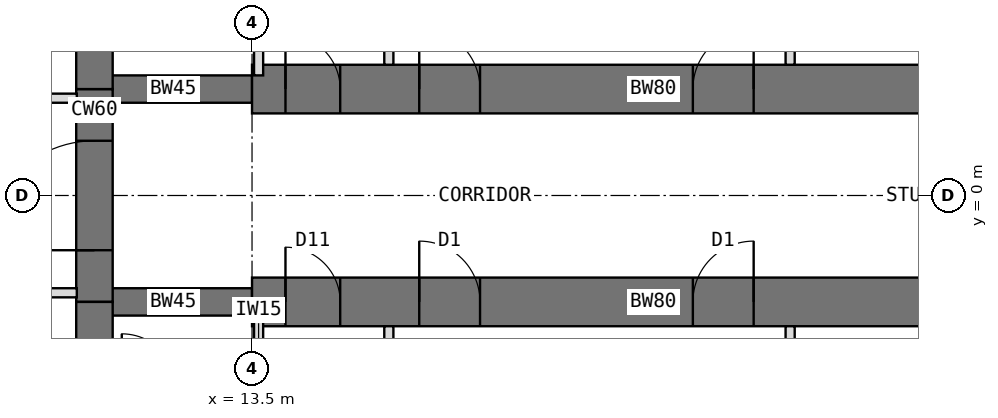
"""IFC4 building model, lengths in metres.
Left out: names, types, materials, properties, quantities, classifications, styles, units other than length and angle.
Written with IfcOpenShell. Run it as: python <this file> out.ifc"""

import sys

from ifc_helpers import new_model, si_unit, direction, frame, frame_2d, origin, place, context, subcontext, project, spatial, rectangle, extrude, element, fill, save


model = new_model("IFC4")
c1 = context("Model", 3, precision=1e-05, world=origin(), true_north=direction((0.0, 1.0)))
c2 = subcontext(c1, "Body", "Model", "MODEL_VIEW")
j1 = project(units=[si_unit("LENGTHUNIT", "METRE"), si_unit("PLANEANGLEUNIT", "RADIAN")], contexts=[c1])
p1 = place(None, origin())
s1 = spatial("IfcSite", under=j1, at=p1, CompositionType="ELEMENT")
p2 = place(p1, origin())
s2 = spatial("IfcBuilding", under=s1, at=p2, CompositionType="ELEMENT")
p3 = place(p2, frame((0.0, 0.0, 125.5)))
s3 = spatial("IfcBuildingStorey", under=s2, at=p3, CompositionType="ELEMENT", Elevation=125.5)
p4 = place(p3, frame((10.908, -6.298, 0.0), z_axis=(0.0, 0.0, 1.0), x_axis=(0.0, 1.0, 0.0)))
e1 = element("IfcWall", 1, at=p4, inside=s3, PredefinedType="SHEAR", context=c2, shape_type="SweptSolid", body=[
    extrude(rectangle(XDim=4.548, YDim=0.6, at=frame_2d((2.274, 0.0))), origin(), (0.0, 0.0, 1.0), 4.0),
])
p5 = place(p3, frame((10.908, -1.75, 0.0), z_axis=(0.0, 0.0, 1.0), x_axis=(0.0, 1.0, 0.0)))
e2 = element("IfcWall", 2, at=p5, inside=s3, PredefinedType="SHEAR", context=c2, shape_type="SweptSolid", body=[
    extrude(rectangle(XDim=3.5, YDim=0.6, at=frame_2d((1.75, 0.0))), origin(), (0.0, 0.0, 1.0), 4.0),
])
p6 = place(p5, frame((0.85, 0.0, 0.0)))
e3 = element("IfcOpeningElement", 3, at=p6, cuts=e2, PredefinedType="OPENING", context=c2, shape_type="SweptSolid", body=[
    extrude(rectangle(XDim=1.8, YDim=2.1, at=frame_2d((0.9, 1.05))), frame((0.0, 0.31, 0.0), z_axis=(0.0, -1.0, 0.0), x_axis=(1.0, 0.0, 0.0)), (0.0, 0.0, 1.0), 0.62),
])
p7 = place(p3, frame((10.908, 1.75, 0.0), z_axis=(0.0, 0.0, 1.0), x_axis=(0.0, 1.0, 0.0)))
e4 = element("IfcWall", 4, at=p7, inside=s3, PredefinedType="SHEAR", context=c2, shape_type="SweptSolid", body=[
    extrude(rectangle(XDim=4.548, YDim=0.6, at=frame_2d((2.274, 0.0))), origin(), (0.0, 0.0, 1.0), 4.0),
])
p8 = place(p3, frame((10.908, 1.75, 0.0), z_axis=(0.0, 0.0, 1.0), x_axis=(1.0, 0.0, 0.0)))
e5 = element("IfcWall", 5, at=p8, inside=s3, PredefinedType="SHEAR", context=c2, shape_type="SweptSolid", body=[
    extrude(rectangle(XDim=2.592, YDim=0.45, at=frame_2d((1.296, 0.0))), origin(), (0.0, 0.0, 1.0), 4.0),
])
p9 = place(p3, frame((13.5, 1.75, 0.0), z_axis=(0.0, 0.0, 1.0), x_axis=(1.0, 0.0, 0.0)))
e6 = element("IfcWall", 6, at=p9, inside=s3, PredefinedType="SHEAR", context=c2, shape_type="SweptSolid", body=[
    extrude(rectangle(XDim=13.2, YDim=0.8, at=frame_2d((6.6, 0.0))), origin(), (0.0, 0.0, 1.0), 4.0),
])
p10 = place(p9, frame((0.55, 0.0, 0.0)))
e7 = element("IfcOpeningElement", 7, at=p10, cuts=e6, PredefinedType="OPENING", context=c2, shape_type="SweptSolid", body=[
    extrude(rectangle(XDim=0.9, YDim=2.1, at=frame_2d((0.45, 1.05))), frame((0.0, 0.41, 0.0), z_axis=(0.0, -1.0, 0.0), x_axis=(1.0, 0.0, 0.0)), (0.0, 0.0, 1.0), 0.82),
])
p11 = place(p9, frame((2.75, 0.0, 0.0)))
e8 = element("IfcOpeningElement", 8, at=p11, cuts=e6, PredefinedType="OPENING", context=c2, shape_type="SweptSolid", body=[
    extrude(rectangle(XDim=1.0, YDim=2.1, at=frame_2d((0.5, 1.05))), frame((0.0, 0.41, 0.0), z_axis=(0.0, -1.0, 0.0), x_axis=(1.0, 0.0, 0.0)), (0.0, 0.0, 1.0), 0.82),
])
p12 = place(p9, frame((7.25, 0.0, 0.0)))
e9 = element("IfcOpeningElement", 9, at=p12, cuts=e6, PredefinedType="OPENING", context=c2, shape_type="SweptSolid", body=[
    extrude(rectangle(XDim=1.0, YDim=2.1, at=frame_2d((0.5, 1.05))), frame((0.0, 0.41, 0.0), z_axis=(0.0, -1.0, 0.0), x_axis=(1.0, 0.0, 0.0)), (0.0, 0.0, 1.0), 0.82),
])
p13 = place(p3, frame((10.908, -1.75, 0.0), z_axis=(0.0, 0.0, 1.0), x_axis=(1.0, 0.0, 0.0)))
e10 = element("IfcWall", 10, at=p13, inside=s3, PredefinedType="SHEAR", context=c2, shape_type="SweptSolid", body=[
    extrude(rectangle(XDim=2.592, YDim=0.45, at=frame_2d((1.296, 0.0))), origin(), (0.0, 0.0, 1.0), 4.0),
])
p14 = place(p3, frame((13.5, -1.75, 0.0), z_axis=(0.0, 0.0, 1.0), x_axis=(1.0, 0.0, 0.0)))
e11 = element("IfcWall", 11, at=p14, inside=s3, PredefinedType="SHEAR", context=c2, shape_type="SweptSolid", body=[
    extrude(rectangle(XDim=13.2, YDim=0.8, at=frame_2d((6.6, 0.0))), origin(), (0.0, 0.0, 1.0), 4.0),
])
p15 = place(p14, frame((0.55, 0.0, 0.0)))
e12 = element("IfcOpeningElement", 12, at=p15, cuts=e11, PredefinedType="OPENING", context=c2, shape_type="SweptSolid", body=[
    extrude(rectangle(XDim=0.9, YDim=2.1, at=frame_2d((0.45, 1.05))), frame((0.0, 0.41, 0.0), z_axis=(0.0, -1.0, 0.0), x_axis=(1.0, 0.0, 0.0)), (0.0, 0.0, 1.0), 0.82),
])
p16 = place(p14, frame((2.75, 0.0, 0.0)))
e13 = element("IfcOpeningElement", 13, at=p16, cuts=e11, PredefinedType="OPENING", context=c2, shape_type="SweptSolid", body=[
    extrude(rectangle(XDim=1.0, YDim=2.1, at=frame_2d((0.5, 1.05))), frame((0.0, 0.41, 0.0), z_axis=(0.0, -1.0, 0.0), x_axis=(1.0, 0.0, 0.0)), (0.0, 0.0, 1.0), 0.82),
])
p17 = place(p14, frame((7.25, 0.0, 0.0)))
e14 = element("IfcOpeningElement", 14, at=p17, cuts=e11, PredefinedType="OPENING", context=c2, shape_type="SweptSolid", body=[
    extrude(rectangle(XDim=1.0, YDim=2.1, at=frame_2d((0.5, 1.05))), frame((0.0, 0.41, 0.0), z_axis=(0.0, -1.0, 0.0), x_axis=(1.0, 0.0, 0.0)), (0.0, 0.0, 1.0), 0.82),
])
p18 = place(p3, frame((15.75, 2.15, 0.0), z_axis=(0.0, 0.0, 1.0), x_axis=(0.0, 1.0, 0.0)))
e15 = element("IfcWall", 15, at=p18, inside=s3, PredefinedType="PARTITIONING", context=c2, shape_type="SweptSolid", body=[
    extrude(rectangle(XDim=4.6, YDim=0.15, at=frame_2d((2.3, 0.0))), origin(), (0.0, 0.0, 1.0), 3.8),
])
p19 = place(p3, frame((22.35, 2.15, 0.0), z_axis=(0.0, 0.0, 1.0), x_axis=(0.0, 1.0, 0.0)))
e16 = element("IfcWall", 16, at=p19, inside=s3, PredefinedType="PARTITIONING", context=c2, shape_type="SweptSolid", body=[
    extrude(rectangle(XDim=2.4, YDim=0.15, at=frame_2d((1.2, 0.0))), origin(), (0.0, 0.0, 1.0), 3.8),
])
p20 = place(p19, frame((0.7, 0.0, 0.0)))
e17 = element("IfcOpeningElement", 17, at=p20, cuts=e16, PredefinedType="OPENING", context=c2, shape_type="SweptSolid", body=[
    extrude(rectangle(XDim=1.0, YDim=2.1, at=frame_2d((0.5, 1.05))), frame((0.0, 0.085, 0.0), z_axis=(0.0, -1.0, 0.0), x_axis=(1.0, 0.0, 0.0)), (0.0, 0.0, 1.0), 0.17),
])
p21 = place(p3, frame((13.608, 1.975, 0.0), z_axis=(0.0, 0.0, 1.0), x_axis=(0.0, 1.0, 0.0)))
e18 = element("IfcWall", 18, at=p21, inside=s3, PredefinedType="PARTITIONING", context=c2, shape_type="SweptSolid", body=[
    extrude(rectangle(XDim=3.2, YDim=0.15, at=frame_2d((1.6, 0.0))), origin(), (0.0, 0.0, 1.0), 3.8),
])
p22 = place(p3, frame((15.75, -2.15, 0.0), z_axis=(0.0, 0.0, 1.0), x_axis=(0.0, -1.0, 0.0)))
e19 = element("IfcWall", 19, at=p22, inside=s3, PredefinedType="PARTITIONING", context=c2, shape_type="SweptSolid", body=[
    extrude(rectangle(XDim=4.6, YDim=0.15, at=frame_2d((2.3, 0.0))), origin(), (0.0, 0.0, 1.0), 3.8),
])
p23 = place(p3, frame((22.35, -2.15, 0.0), z_axis=(0.0, 0.0, 1.0), x_axis=(0.0, -1.0, 0.0)))
e20 = element("IfcWall", 20, at=p23, inside=s3, PredefinedType="PARTITIONING", context=c2, shape_type="SweptSolid", body=[
    extrude(rectangle(XDim=2.4, YDim=0.15, at=frame_2d((1.2, 0.0))), origin(), (0.0, 0.0, 1.0), 3.8),
])
p24 = place(p23, frame((0.7, 0.0, 0.0)))
e21 = element("IfcOpeningElement", 21, at=p24, cuts=e20, PredefinedType="OPENING", context=c2, shape_type="SweptSolid", body=[
    extrude(rectangle(XDim=1.0, YDim=2.1, at=frame_2d((0.5, 1.05))), frame((0.0, 0.085, 0.0), z_axis=(0.0, -1.0, 0.0), x_axis=(1.0, 0.0, 0.0)), (0.0, 0.0, 1.0), 0.17),
])
p25 = place(p3, frame((13.608, -1.975, 0.0), z_axis=(0.0, 0.0, 1.0), x_axis=(0.0, -1.0, 0.0)))
e22 = element("IfcWall", 22, at=p25, inside=s3, PredefinedType="PARTITIONING", context=c2, shape_type="SweptSolid", body=[
    extrude(rectangle(XDim=1.2, YDim=0.15, at=frame_2d((0.6, 0.0))), origin(), (0.0, 0.0, 1.0), 3.8),
])
p26 = place(p3, frame((6.1, 1.6, 0.0), z_axis=(0.0, 0.0, 1.0), x_axis=(1.0, 0.0, 0.0)))
e23 = element("IfcWall", 23, at=p26, inside=s3, PredefinedType="PARTITIONING", context=c2, shape_type="SweptSolid", body=[
    extrude(rectangle(XDim=4.519, YDim=0.15, at=frame_2d((2.259, 0.0))), origin(), (0.0, 0.0, 1.0), 3.8),
])
p27 = place(p26, frame((1.769, 0.0, 0.0)))
e24 = element("IfcOpeningElement", 24, at=p27, cuts=e23, PredefinedType="OPENING", context=c2, shape_type="SweptSolid", body=[
    extrude(rectangle(XDim=1.0, YDim=2.1, at=frame_2d((0.5, 1.05))), frame((0.0, 0.085, 0.0), z_axis=(0.0, -1.0, 0.0), x_axis=(1.0, 0.0, 0.0)), (0.0, 0.0, 1.0), 0.17),
])
p28 = place(p3, frame((10.618, -1.6, 0.0), z_axis=(0.0, 0.0, 1.0), x_axis=(-1.0, 0.0, 0.0)))
e25 = element("IfcWall", 25, at=p28, inside=s3, PredefinedType="PARTITIONING", context=c2, shape_type="SweptSolid", body=[
    extrude(rectangle(XDim=4.519, YDim=0.15, at=frame_2d((2.259, 0.0))), origin(), (0.0, 0.0, 1.0), 3.8),
])
p29 = place(p28, frame((1.749, 0.0, 0.0)))
e26 = element("IfcOpeningElement", 26, at=p29, cuts=e25, PredefinedType="OPENING", context=c2, shape_type="SweptSolid", body=[
    extrude(rectangle(XDim=1.0, YDim=2.1, at=frame_2d((0.5, 1.05))), frame((0.0, 0.085, 0.0), z_axis=(0.0, -1.0, 0.0), x_axis=(1.0, 0.0, 0.0)), (0.0, 0.0, 1.0), 0.17),
])
p30 = place(p6, origin())
e27 = element("IfcDoor", 27, at=p30, inside=s3, OperationType="DOUBLE_DOOR_DOUBLE_SWING", PredefinedType="DOOR", context=c2, shape_type="SweptSolid", body=[
    extrude(rectangle(XDim=1.72, YDim=2.06, at=frame_2d((0.9, 1.03))), frame((0.0, 0.025, 0.0), z_axis=(0.0, -1.0, 0.0), x_axis=(1.0, 0.0, 0.0)), (0.0, 0.0, 1.0), 0.05),
    extrude(rectangle(XDim=0.04, YDim=2.1, at=frame_2d((0.02, 1.05))), frame((0.0, 0.3, 0.0), z_axis=(0.0, -1.0, 0.0), x_axis=(1.0, 0.0, 0.0)), (0.0, 0.0, 1.0), 0.6),
    extrude(rectangle(XDim=0.04, YDim=2.1, at=frame_2d((1.78, 1.05))), frame((0.0, 0.3, 0.0), z_axis=(0.0, -1.0, 0.0), x_axis=(1.0, 0.0, 0.0)), (0.0, 0.0, 1.0), 0.6),
    extrude(rectangle(XDim=1.72, YDim=0.04, at=frame_2d((0.9, 2.08))), frame((0.0, 0.3, 0.0), z_axis=(0.0, -1.0, 0.0), x_axis=(1.0, 0.0, 0.0)), (0.0, 0.0, 1.0), 0.6),
])
fill(e3, e27)
p31 = place(p10, origin())
e28 = element("IfcDoor", 28, at=p31, inside=s3, OperationType="SINGLE_SWING_LEFT", PredefinedType="DOOR", context=c2, shape_type="SweptSolid", body=[
    extrude(rectangle(XDim=0.82, YDim=2.06, at=frame_2d((0.45, 1.03))), frame((0.0, 0.025, 0.0), z_axis=(0.0, -1.0, 0.0), x_axis=(1.0, 0.0, 0.0)), (0.0, 0.0, 1.0), 0.05),
    extrude(rectangle(XDim=0.04, YDim=2.1, at=frame_2d((0.02, 1.05))), frame((0.0, 0.4, 0.0), z_axis=(0.0, -1.0, 0.0), x_axis=(1.0, 0.0, 0.0)), (0.0, 0.0, 1.0), 0.8),
    extrude(rectangle(XDim=0.04, YDim=2.1, at=frame_2d((0.88, 1.05))), frame((0.0, 0.4, 0.0), z_axis=(0.0, -1.0, 0.0), x_axis=(1.0, 0.0, 0.0)), (0.0, 0.0, 1.0), 0.8),
    extrude(rectangle(XDim=0.82, YDim=0.04, at=frame_2d((0.45, 2.08))), frame((0.0, 0.4, 0.0), z_axis=(0.0, -1.0, 0.0), x_axis=(1.0, 0.0, 0.0)), (0.0, 0.0, 1.0), 0.8),
])
fill(e7, e28)
p32 = place(p11, origin())
e29 = element("IfcDoor", 29, at=p32, inside=s3, OperationType="SINGLE_SWING_LEFT", PredefinedType="DOOR", context=c2, shape_type="SweptSolid", body=[
    extrude(rectangle(XDim=0.92, YDim=2.06, at=frame_2d((0.5, 1.03))), frame((0.0, 0.025, 0.0), z_axis=(0.0, -1.0, 0.0), x_axis=(1.0, 0.0, 0.0)), (0.0, 0.0, 1.0), 0.05),
    extrude(rectangle(XDim=0.04, YDim=2.1, at=frame_2d((0.02, 1.05))), frame((0.0, 0.4, 0.0), z_axis=(0.0, -1.0, 0.0), x_axis=(1.0, 0.0, 0.0)), (0.0, 0.0, 1.0), 0.8),
    extrude(rectangle(XDim=0.04, YDim=2.1, at=frame_2d((0.98, 1.05))), frame((0.0, 0.4, 0.0), z_axis=(0.0, -1.0, 0.0), x_axis=(1.0, 0.0, 0.0)), (0.0, 0.0, 1.0), 0.8),
    extrude(rectangle(XDim=0.92, YDim=0.04, at=frame_2d((0.5, 2.08))), frame((0.0, 0.4, 0.0), z_axis=(0.0, -1.0, 0.0), x_axis=(1.0, 0.0, 0.0)), (0.0, 0.0, 1.0), 0.8),
])
fill(e8, e29)
p33 = place(p12, origin())
e30 = element("IfcDoor", 30, at=p33, inside=s3, OperationType="SINGLE_SWING_RIGHT", PredefinedType="DOOR", context=c2, shape_type="SweptSolid", body=[
    extrude(rectangle(XDim=0.92, YDim=2.06, at=frame_2d((0.5, 1.03))), frame((0.0, 0.025, 0.0), z_axis=(0.0, -1.0, 0.0), x_axis=(1.0, 0.0, 0.0)), (0.0, 0.0, 1.0), 0.05),
    extrude(rectangle(XDim=0.04, YDim=2.1, at=frame_2d((0.02, 1.05))), frame((0.0, 0.4, 0.0), z_axis=(0.0, -1.0, 0.0), x_axis=(1.0, 0.0, 0.0)), (0.0, 0.0, 1.0), 0.8),
    extrude(rectangle(XDim=0.04, YDim=2.1, at=frame_2d((0.98, 1.05))), frame((0.0, 0.4, 0.0), z_axis=(0.0, -1.0, 0.0), x_axis=(1.0, 0.0, 0.0)), (0.0, 0.0, 1.0), 0.8),
    extrude(rectangle(XDim=0.92, YDim=0.04, at=frame_2d((0.5, 2.08))), frame((0.0, 0.4, 0.0), z_axis=(0.0, -1.0, 0.0), x_axis=(1.0, 0.0, 0.0)), (0.0, 0.0, 1.0), 0.8),
])
fill(e9, e30)
p34 = place(p15, origin())
e31 = element("IfcDoor", 31, at=p34, inside=s3, OperationType="SINGLE_SWING_LEFT", PredefinedType="DOOR", context=c2, shape_type="SweptSolid", body=[
    extrude(rectangle(XDim=0.82, YDim=2.06, at=frame_2d((0.45, 1.03))), frame((0.0, 0.025, 0.0), z_axis=(0.0, -1.0, 0.0), x_axis=(1.0, 0.0, 0.0)), (0.0, 0.0, 1.0), 0.05),
    extrude(rectangle(XDim=0.04, YDim=2.1, at=frame_2d((0.02, 1.05))), frame((0.0, 0.4, 0.0), z_axis=(0.0, -1.0, 0.0), x_axis=(1.0, 0.0, 0.0)), (0.0, 0.0, 1.0), 0.8),
    extrude(rectangle(XDim=0.04, YDim=2.1, at=frame_2d((0.88, 1.05))), frame((0.0, 0.4, 0.0), z_axis=(0.0, -1.0, 0.0), x_axis=(1.0, 0.0, 0.0)), (0.0, 0.0, 1.0), 0.8),
    extrude(rectangle(XDim=0.82, YDim=0.04, at=frame_2d((0.45, 2.08))), frame((0.0, 0.4, 0.0), z_axis=(0.0, -1.0, 0.0), x_axis=(1.0, 0.0, 0.0)), (0.0, 0.0, 1.0), 0.8),
])
fill(e12, e31)
p35 = place(p16, origin())
e32 = element("IfcDoor", 32, at=p35, inside=s3, OperationType="SINGLE_SWING_LEFT", PredefinedType="DOOR", context=c2, shape_type="SweptSolid", body=[
    extrude(rectangle(XDim=0.92, YDim=2.06, at=frame_2d((0.5, 1.03))), frame((0.0, 0.025, 0.0), z_axis=(0.0, -1.0, 0.0), x_axis=(1.0, 0.0, 0.0)), (0.0, 0.0, 1.0), 0.05),
    extrude(rectangle(XDim=0.04, YDim=2.1, at=frame_2d((0.02, 1.05))), frame((0.0, 0.4, 0.0), z_axis=(0.0, -1.0, 0.0), x_axis=(1.0, 0.0, 0.0)), (0.0, 0.0, 1.0), 0.8),
    extrude(rectangle(XDim=0.04, YDim=2.1, at=frame_2d((0.98, 1.05))), frame((0.0, 0.4, 0.0), z_axis=(0.0, -1.0, 0.0), x_axis=(1.0, 0.0, 0.0)), (0.0, 0.0, 1.0), 0.8),
    extrude(rectangle(XDim=0.92, YDim=0.04, at=frame_2d((0.5, 2.08))), frame((0.0, 0.4, 0.0), z_axis=(0.0, -1.0, 0.0), x_axis=(1.0, 0.0, 0.0)), (0.0, 0.0, 1.0), 0.8),
])
fill(e13, e32)
p36 = place(p17, origin())
e33 = element("IfcDoor", 33, at=p36, inside=s3, OperationType="SINGLE_SWING_RIGHT", PredefinedType="DOOR", context=c2, shape_type="SweptSolid", body=[
    extrude(rectangle(XDim=0.92, YDim=2.06, at=frame_2d((0.5, 1.03))), frame((0.0, 0.025, 0.0), z_axis=(0.0, -1.0, 0.0), x_axis=(1.0, 0.0, 0.0)), (0.0, 0.0, 1.0), 0.05),
    extrude(rectangle(XDim=0.04, YDim=2.1, at=frame_2d((0.02, 1.05))), frame((0.0, 0.4, 0.0), z_axis=(0.0, -1.0, 0.0), x_axis=(1.0, 0.0, 0.0)), (0.0, 0.0, 1.0), 0.8),
    extrude(rectangle(XDim=0.04, YDim=2.1, at=frame_2d((0.98, 1.05))), frame((0.0, 0.4, 0.0), z_axis=(0.0, -1.0, 0.0), x_axis=(1.0, 0.0, 0.0)), (0.0, 0.0, 1.0), 0.8),
    extrude(rectangle(XDim=0.92, YDim=0.04, at=frame_2d((0.5, 2.08))), frame((0.0, 0.4, 0.0), z_axis=(0.0, -1.0, 0.0), x_axis=(1.0, 0.0, 0.0)), (0.0, 0.0, 1.0), 0.8),
])
fill(e14, e33)
save(model, sys.argv[1])
